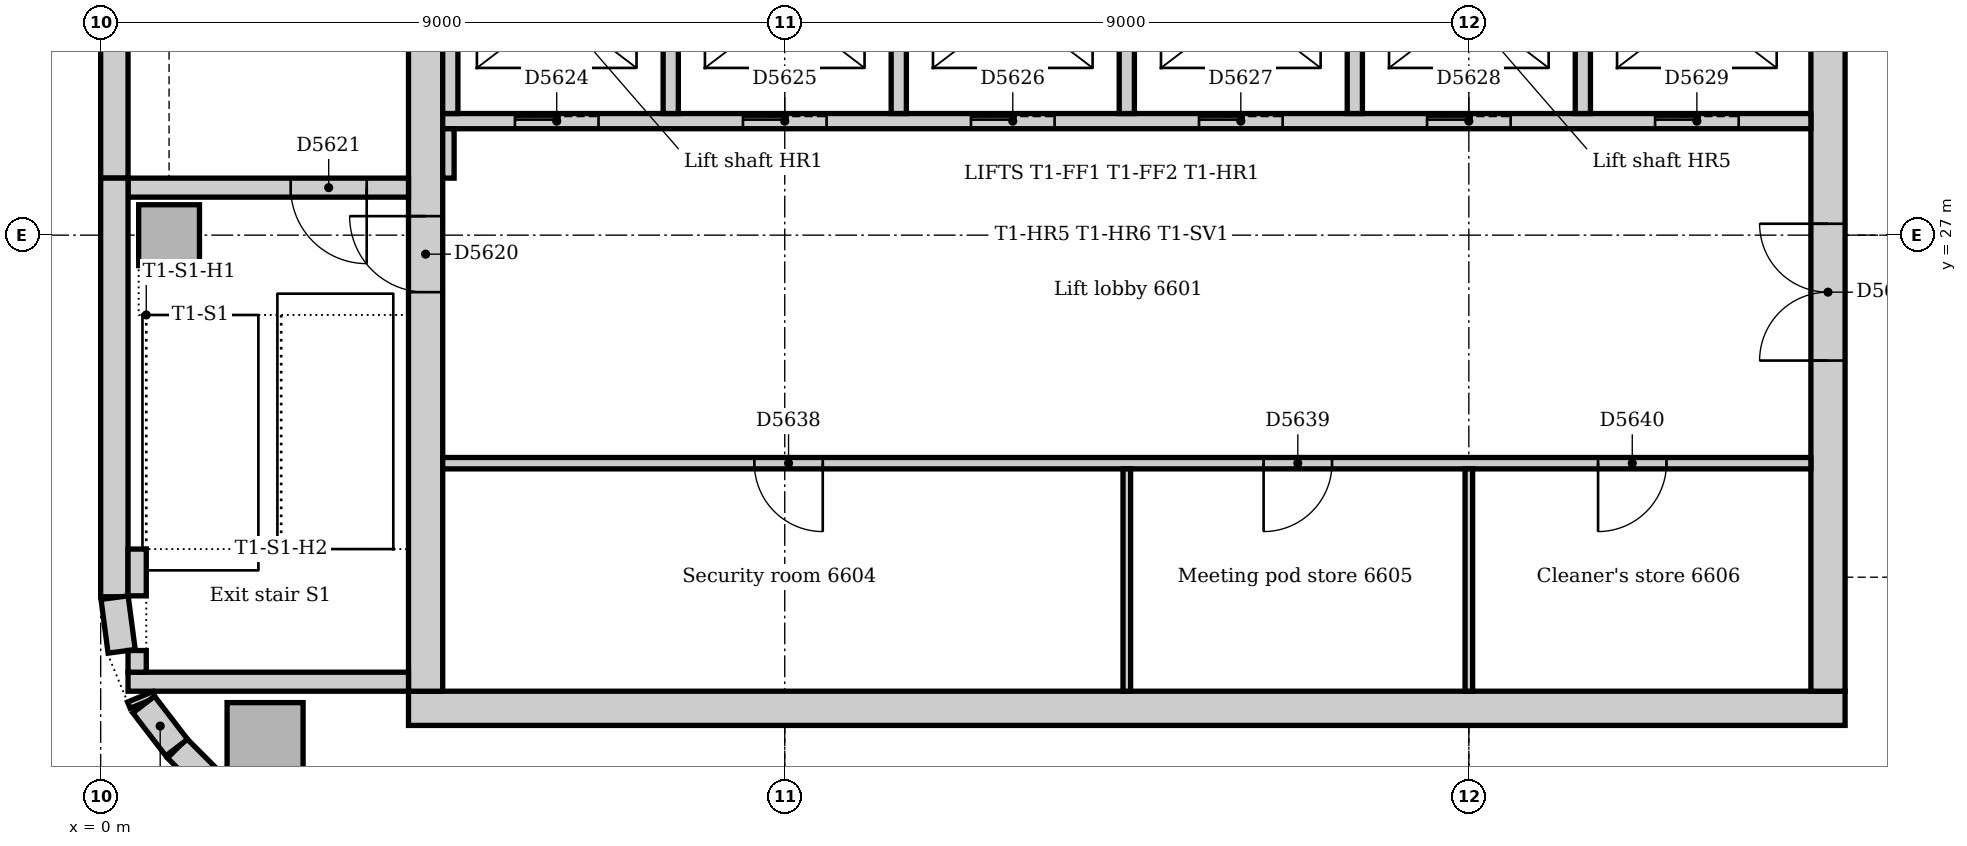
"""IFC4 building model, lengths in metres.
Left out: names, types, materials, properties, quantities, classifications, styles, units other than length and angle.
Written with IfcOpenShell. Run it as: python <this file> out.ifc"""

import sys

from ifc_helpers import new_model, si_unit, direction, frame, frame_2d, origin, origin_2d, place, context, subcontext, project, spatial, rectangle, extrude, element, fill, save


model = new_model("IFC4")
c1 = context("Model", 3, precision=1e-05, world=origin(), true_north=direction((0.0, 1.0)))
c2 = subcontext(c1, "Body", "Model", "MODEL_VIEW")
j1 = project(units=[si_unit("LENGTHUNIT", "METRE"), si_unit("PLANEANGLEUNIT", "RADIAN")], contexts=[c1])
p1 = place(None, origin())
s1 = spatial("IfcSite", under=j1, at=p1, CompositionType="ELEMENT")
p2 = place(p1, origin())
s2 = spatial("IfcBuilding", under=s1, at=p2, CompositionType="ELEMENT")
p3 = place(p2, frame((0.0, 0.0, 275.0)))
s3 = spatial("IfcBuildingStorey", under=s2, at=p3, CompositionType="ELEMENT", Elevation=275.0)
p4 = place(p3, frame((4.05, 20.775, 0.0), z_axis=(0.0, 0.0, 1.0), x_axis=(1.0, 0.0, 0.0)))
e1 = element("IfcWall", 1, at=p4, inside=s3, PredefinedType="SOLIDWALL", context=c2, shape_type="SweptSolid", body=[
    extrude(rectangle(XDim=18.9, YDim=0.45, at=frame_2d((9.45, 0.0))), origin(), (0.0, 0.0, 1.0), 4.0),
])
p5 = place(p3, frame((22.725, 21.0, 0.0), z_axis=(0.0, 0.0, 1.0), x_axis=(0.0, 1.0, 0.0)))
e2 = element("IfcWall", 2, at=p5, inside=s3, PredefinedType="SOLIDWALL", context=c2, shape_type="SweptSolid", body=[
    extrude(rectangle(XDim=10.5, YDim=0.45, at=frame_2d((5.25, 0.0))), origin(), (0.0, 0.0, 1.0), 4.0),
])
p6 = place(p5, frame((4.35, 0.0, 0.0)))
e3 = element("IfcOpeningElement", 3, at=p6, cuts=e2, PredefinedType="OPENING", context=c2, shape_type="SweptSolid", body=[
    extrude(rectangle(XDim=1.8, YDim=2.1, at=frame_2d((0.9, 1.05))), frame((0.0, 0.235, 0.0), z_axis=(0.0, -1.0, 0.0), x_axis=(1.0, 0.0, 0.0)), (0.0, 0.0, 1.0), 0.47),
])
p7 = place(p3, frame((4.275, 31.5, 0.0), z_axis=(0.0, 0.0, 1.0), x_axis=(0.0, -1.0, 0.0)))
e4 = element("IfcWall", 4, at=p7, inside=s3, PredefinedType="SOLIDWALL", context=c2, shape_type="SweptSolid", body=[
    extrude(rectangle(XDim=10.5, YDim=0.45, at=frame_2d((5.25, 0.0))), origin(), (0.0, 0.0, 1.0), 4.0),
])
p8 = place(p7, frame((4.25, 0.0, 0.0)))
e5 = element("IfcOpeningElement", 5, at=p8, cuts=e4, PredefinedType="OPENING", context=c2, shape_type="SweptSolid", body=[
    extrude(rectangle(XDim=1.0, YDim=2.1, at=frame_2d((0.5, 1.05))), frame((0.0, 0.235, 0.0), z_axis=(0.0, -1.0, 0.0), x_axis=(1.0, 0.0, 0.0)), (0.0, 0.0, 1.0), 0.47),
])
p9 = place(p3, frame((0.36, 21.125, 0.0), z_axis=(0.0, 0.0, 1.0), x_axis=(1.0, 0.0, 0.0)))
e6 = element("IfcWall", 6, at=p9, inside=s3, PredefinedType="SOLIDWALL", context=c2, shape_type="SweptSolid", body=[
    extrude(rectangle(XDim=3.69, YDim=0.25, at=frame_2d((1.845, 0.0))), origin(), (0.0, 0.0, 1.0), 4.0),
])
p10 = place(p3, frame((4.05, 27.625, 0.0), z_axis=(0.0, 0.0, 1.0), x_axis=(-1.0, 0.0, 0.0)))
e7 = element("IfcWall", 7, at=p10, inside=s3, PredefinedType="SOLIDWALL", context=c2, shape_type="SweptSolid", body=[
    extrude(rectangle(XDim=3.69, YDim=0.25, at=frame_2d((1.845, 0.0))), origin(), (0.0, 0.0, 1.0), 4.0),
])
p11 = place(p10, frame((0.55, 0.0, 0.0)))
e8 = element("IfcOpeningElement", 8, at=p11, cuts=e7, PredefinedType="OPENING", context=c2, shape_type="SweptSolid", body=[
    extrude(rectangle(XDim=1.0, YDim=2.1, at=frame_2d((0.5, 1.05))), frame((0.0, 0.135, 0.0), z_axis=(0.0, -1.0, 0.0), x_axis=(1.0, 0.0, 0.0)), (0.0, 0.0, 1.0), 0.27),
])
p12 = place(p3, frame((2.163, 20.35, 0.0), z_axis=(0.0, 0.0, 1.0), x_axis=(1.0, 0.0, 0.0)))
e9 = element("IfcColumn", 9, at=p12, inside=s3, PredefinedType="COLUMN", context=c2, shape_type="SweptSolid", body=[
    extrude(rectangle(XDim=1.0, YDim=1.0, at=origin_2d()), origin(), (0.0, 0.0, 1.0), 3.85),
])
p13 = place(p3, frame((0.9, 27.0, 0.0), z_axis=(0.0, 0.0, 1.0), x_axis=(1.0, 0.0, 0.0)))
e10 = element("IfcColumn", 10, at=p13, inside=s3, PredefinedType="COLUMN", context=c2, shape_type="SweptSolid", body=[
    extrude(rectangle(XDim=0.8, YDim=0.8, at=origin_2d()), origin(), (0.0, 0.0, 1.0), 4.0),
])
p14 = place(p3, frame((0.18, 35.25, 0.0), z_axis=(0.0, 0.0, 1.0), x_axis=(0.0, -1.0, 0.0)))
e11 = element("IfcWall", 11, at=p14, inside=s3, PredefinedType="STANDARD", context=c2, shape_type="SweptSolid", body=[
    extrude(rectangle(XDim=7.5, YDim=0.36, at=frame_2d((3.75, 0.0))), origin(), (0.0, 0.0, 1.0), 3.85),
])
p15 = place(p3, frame((0.18, 27.75, 0.0), z_axis=(0.0, 0.0, 1.0), x_axis=(0.0, -1.0, 0.0)))
e12 = element("IfcWall", 12, at=p15, inside=s3, PredefinedType="STANDARD", context=c2, shape_type="SweptSolid", body=[
    extrude(rectangle(XDim=5.507, YDim=0.36, at=frame_2d((2.754, 0.0))), origin(), (0.0, 0.0, 1.0), 3.85),
])
p16 = place(p3, frame((1.006, 20.249, 0.0), z_axis=(0.0, 0.0, 1.0), x_axis=(0.707106781187, -0.707106781187, 0.0)))
e13 = element("IfcWall", 13, at=p16, inside=s3, PredefinedType="STANDARD", context=c2, shape_type="SweptSolid", body=[
    extrude(rectangle(XDim=1.757, YDim=0.36, at=frame_2d((0.879, 0.0))), origin(), (0.0, 0.0, 1.0), 3.85),
])
p17 = place(p3, frame((0.183, 22.231, 0.0), z_axis=(0.0, 0.0, 1.0), x_axis=(0.13055608231, -0.99144092581, 0.0)))
e14 = element("IfcWall", 14, at=p17, inside=s3, PredefinedType="STANDARD", context=c2, shape_type="SweptSolid", body=[
    extrude(rectangle(XDim=0.713, YDim=0.36, at=frame_2d((0.356, 0.0))), origin(), (0.0, 0.0, 1.0), 3.85),
])
p18 = place(p3, frame((0.521, 20.927, 0.0), z_axis=(0.0, 0.0, 1.0), x_axis=(0.382549378284, -0.923935048136, 0.0)))
e15 = element("IfcWall", 15, at=p18, inside=s3, PredefinedType="STANDARD", context=c2, shape_type="SweptSolid", body=[
    extrude(rectangle(XDim=0.089, YDim=0.36, at=frame_2d((0.045, 0.0))), origin(), (0.0, 0.0, 1.0), 3.85),
])
p19 = place(p3, frame((0.566, 20.825, 0.0), z_axis=(0.0, 0.0, 1.0), x_axis=(0.608802368033, -0.793321924995, 0.0)))
e16 = element("IfcWall", 16, at=p19, inside=s3, PredefinedType="STANDARD", context=c2, shape_type="SweptSolid", body=[
    extrude(rectangle(XDim=0.713, YDim=0.36, at=frame_2d((0.357, 0.0))), origin(), (0.0, 0.0, 1.0), 3.85),
])
p20 = place(p3, frame((0.48, 21.25, 0.0), z_axis=(0.0, 0.0, 1.0), x_axis=(0.0, 1.0, 0.0)))
e17 = element("IfcWall", 17, at=p20, inside=s3, PredefinedType="STANDARD", context=c2, shape_type="SweptSolid", body=[
    extrude(rectangle(XDim=0.285, YDim=0.24, at=frame_2d((0.143, 0.0))), origin(), (0.0, 0.0, 1.0), 4.0),
])
p21 = place(p3, frame((0.48, 22.255, 0.0), z_axis=(0.0, 0.0, 1.0), x_axis=(0.0, 1.0, 0.0)))
e18 = element("IfcWall", 18, at=p21, inside=s3, PredefinedType="STANDARD", context=c2, shape_type="SweptSolid", body=[
    extrude(rectangle(XDim=0.615, YDim=0.24, at=frame_2d((0.307, 0.0))), origin(), (0.0, 0.0, 1.0), 4.0),
])
p22 = place(p3, frame((4.5, 28.5, 0.0), z_axis=(0.0, 0.0, 1.0), x_axis=(1.0, 0.0, 0.0)))
e19 = element("IfcWall", 19, at=p22, inside=s3, PredefinedType="PARTITIONING", context=c2, shape_type="SweptSolid", body=[
    extrude(rectangle(XDim=18.0, YDim=0.2, at=frame_2d((9.0, 0.0))), origin(), (0.0, 0.0, 1.0), 3.85),
])
p23 = place(p22, frame((0.95, 0.0, 0.0)))
e20 = element("IfcOpeningElement", 20, at=p23, cuts=e19, PredefinedType="OPENING", context=c2, shape_type="SweptSolid", body=[
    extrude(rectangle(XDim=1.1, YDim=2.1, at=frame_2d((0.55, 1.05))), frame((0.0, 0.11, 0.0), z_axis=(0.0, -1.0, 0.0), x_axis=(1.0, 0.0, 0.0)), (0.0, 0.0, 1.0), 0.22),
])
p24 = place(p22, frame((3.95, 0.0, 0.0)))
e21 = element("IfcOpeningElement", 21, at=p24, cuts=e19, PredefinedType="OPENING", context=c2, shape_type="SweptSolid", body=[
    extrude(rectangle(XDim=1.1, YDim=2.1, at=frame_2d((0.55, 1.05))), frame((0.0, 0.11, 0.0), z_axis=(0.0, -1.0, 0.0), x_axis=(1.0, 0.0, 0.0)), (0.0, 0.0, 1.0), 0.22),
])
p25 = place(p22, frame((6.95, 0.0, 0.0)))
e22 = element("IfcOpeningElement", 22, at=p25, cuts=e19, PredefinedType="OPENING", context=c2, shape_type="SweptSolid", body=[
    extrude(rectangle(XDim=1.1, YDim=2.1, at=frame_2d((0.55, 1.05))), frame((0.0, 0.11, 0.0), z_axis=(0.0, -1.0, 0.0), x_axis=(1.0, 0.0, 0.0)), (0.0, 0.0, 1.0), 0.22),
])
p26 = place(p22, frame((9.95, 0.0, 0.0)))
e23 = element("IfcOpeningElement", 23, at=p26, cuts=e19, PredefinedType="OPENING", context=c2, shape_type="SweptSolid", body=[
    extrude(rectangle(XDim=1.1, YDim=2.1, at=frame_2d((0.55, 1.05))), frame((0.0, 0.11, 0.0), z_axis=(0.0, -1.0, 0.0), x_axis=(1.0, 0.0, 0.0)), (0.0, 0.0, 1.0), 0.22),
])
p27 = place(p22, frame((12.95, 0.0, 0.0)))
e24 = element("IfcOpeningElement", 24, at=p27, cuts=e19, PredefinedType="OPENING", context=c2, shape_type="SweptSolid", body=[
    extrude(rectangle(XDim=1.1, YDim=2.1, at=frame_2d((0.55, 1.05))), frame((0.0, 0.11, 0.0), z_axis=(0.0, -1.0, 0.0), x_axis=(1.0, 0.0, 0.0)), (0.0, 0.0, 1.0), 0.22),
])
p28 = place(p22, frame((15.95, 0.0, 0.0)))
e25 = element("IfcOpeningElement", 25, at=p28, cuts=e19, PredefinedType="OPENING", context=c2, shape_type="SweptSolid", body=[
    extrude(rectangle(XDim=1.1, YDim=2.1, at=frame_2d((0.55, 1.05))), frame((0.0, 0.11, 0.0), z_axis=(0.0, -1.0, 0.0), x_axis=(1.0, 0.0, 0.0)), (0.0, 0.0, 1.0), 0.22),
])
for number, where, z_axis, x_axis in (
    (26, (10.5, 28.6, 0.0), (0.0, 0.0, 1.0), (0.0, 1.0, 0.0)),
    (27, (13.5, 28.6, 0.0), (0.0, 0.0, 1.0), (0.0, 1.0, 0.0)),
    (28, (16.5, 28.6, 0.0), (0.0, 0.0, 1.0), (0.0, 1.0, 0.0)),
    (29, (19.5, 28.6, 0.0), (0.0, 0.0, 1.0), (0.0, 1.0, 0.0)),
    (30, (4.6, 28.6, 0.0), (0.0, 0.0, 1.0), (0.0, 1.0, 0.0)),
    (31, (7.5, 28.6, 0.0), (0.0, 0.0, 1.0), (0.0, 1.0, 0.0)),
):
    element("IfcWall", number, at=place(p3, frame(where, z_axis=z_axis, x_axis=x_axis)), inside=s3, PredefinedType="PARTITIONING", context=c2, shape_type="SweptSolid", body=[
        extrude(rectangle(XDim=2.65, YDim=0.2, at=frame_2d((1.325, 0.0))), origin(), (0.0, 0.0, 1.0), 3.85),
    ])
p29 = place(p3, frame((4.5, 24.0, 0.0), z_axis=(0.0, 0.0, 1.0), x_axis=(1.0, 0.0, 0.0)))
e32 = element("IfcWall", 32, at=p29, inside=s3, PredefinedType="PARTITIONING", context=c2, shape_type="SweptSolid", body=[
    extrude(rectangle(XDim=18.0, YDim=0.15, at=frame_2d((9.0, 0.0))), origin(), (0.0, 0.0, 1.0), 3.85),
])
p30 = place(p29, frame((4.1, 0.0, 0.0)))
e33 = element("IfcOpeningElement", 33, at=p30, cuts=e32, PredefinedType="OPENING", context=c2, shape_type="SweptSolid", body=[
    extrude(rectangle(XDim=0.9, YDim=2.1, at=frame_2d((0.45, 1.05))), frame((0.0, 0.085, 0.0), z_axis=(0.0, -1.0, 0.0), x_axis=(1.0, 0.0, 0.0)), (0.0, 0.0, 1.0), 0.17),
])
p31 = place(p29, frame((10.8, 0.0, 0.0)))
e34 = element("IfcOpeningElement", 34, at=p31, cuts=e32, PredefinedType="OPENING", context=c2, shape_type="SweptSolid", body=[
    extrude(rectangle(XDim=0.9, YDim=2.1, at=frame_2d((0.45, 1.05))), frame((0.0, 0.085, 0.0), z_axis=(0.0, -1.0, 0.0), x_axis=(1.0, 0.0, 0.0)), (0.0, 0.0, 1.0), 0.17),
])
p32 = place(p29, frame((15.2, 0.0, 0.0)))
e35 = element("IfcOpeningElement", 35, at=p32, cuts=e32, PredefinedType="OPENING", context=c2, shape_type="SweptSolid", body=[
    extrude(rectangle(XDim=0.9, YDim=2.1, at=frame_2d((0.45, 1.05))), frame((0.0, 0.085, 0.0), z_axis=(0.0, -1.0, 0.0), x_axis=(1.0, 0.0, 0.0)), (0.0, 0.0, 1.0), 0.17),
])
p33 = place(p3, frame((4.575, 27.75, 0.0), z_axis=(0.0, 0.0, 1.0), x_axis=(0.0, 1.0, 0.0)))
e36 = element("IfcWall", 36, at=p33, inside=s3, PredefinedType="PARTITIONING", context=c2, shape_type="SweptSolid", body=[
    extrude(rectangle(XDim=0.65, YDim=0.15, at=frame_2d((0.325, 0.0))), origin(), (0.0, 0.0, 1.0), 3.85),
])
for number, where, z_axis, x_axis in (
    (37, (13.5, 21.0, 0.0), (0.0, 0.0, 1.0), (0.0, 1.0, 0.0)),
    (38, (18.0, 21.0, 0.0), (0.0, 0.0, 1.0), (0.0, 1.0, 0.0)),
):
    element("IfcWall", number, at=place(p3, frame(where, z_axis=z_axis, x_axis=x_axis)), inside=s3, PredefinedType="PARTITIONING", context=c2, shape_type="SweptSolid", body=[
        extrude(rectangle(XDim=2.925, YDim=0.1, at=frame_2d((1.462, 0.0))), origin(), (0.0, 0.0, 1.0), 3.85),
    ])
p34 = place(p8, frame((1.0, 0.0, 0.0), z_axis=(0.0, 0.0, 1.0), x_axis=(-1.0, 0.0, 0.0)))
e39 = element("IfcDoor", 39, at=p34, inside=s3, OperationType="SINGLE_SWING_RIGHT", PredefinedType="DOOR", context=c2, shape_type="SweptSolid", body=[
    extrude(rectangle(XDim=1.0, YDim=2.1, at=frame_2d((0.5, 1.05))), frame((0.0, 0.025, 0.0), z_axis=(0.0, -1.0, 0.0), x_axis=(1.0, 0.0, 0.0)), (0.0, 0.0, 1.0), 0.05),
])
fill(e5, e39)
p35 = place(p11, origin())
e40 = element("IfcDoor", 40, at=p35, inside=s3, OperationType="SINGLE_SWING_LEFT", PredefinedType="DOOR", context=c2, shape_type="SweptSolid", body=[
    extrude(rectangle(XDim=1.0, YDim=2.1, at=frame_2d((0.5, 1.05))), frame((0.0, 0.025, 0.0), z_axis=(0.0, -1.0, 0.0), x_axis=(1.0, 0.0, 0.0)), (0.0, 0.0, 1.0), 0.05),
])
fill(e8, e40)
p36 = place(p23, origin())
e41 = element("IfcDoor", 41, at=p36, inside=s3, OperationType="SLIDING_TO_LEFT", PredefinedType="DOOR", context=c2, shape_type="SweptSolid", body=[
    extrude(rectangle(XDim=1.1, YDim=2.1, at=frame_2d((0.55, 1.05))), frame((0.0, 0.025, 0.0), z_axis=(0.0, -1.0, 0.0), x_axis=(1.0, 0.0, 0.0)), (0.0, 0.0, 1.0), 0.05),
])
fill(e20, e41)
p37 = place(p24, origin())
e42 = element("IfcDoor", 42, at=p37, inside=s3, OperationType="SLIDING_TO_LEFT", PredefinedType="DOOR", context=c2, shape_type="SweptSolid", body=[
    extrude(rectangle(XDim=1.1, YDim=2.1, at=frame_2d((0.55, 1.05))), frame((0.0, 0.025, 0.0), z_axis=(0.0, -1.0, 0.0), x_axis=(1.0, 0.0, 0.0)), (0.0, 0.0, 1.0), 0.05),
])
fill(e21, e42)
p38 = place(p25, origin())
e43 = element("IfcDoor", 43, at=p38, inside=s3, OperationType="SLIDING_TO_LEFT", PredefinedType="DOOR", context=c2, shape_type="SweptSolid", body=[
    extrude(rectangle(XDim=1.1, YDim=2.1, at=frame_2d((0.55, 1.05))), frame((0.0, 0.025, 0.0), z_axis=(0.0, -1.0, 0.0), x_axis=(1.0, 0.0, 0.0)), (0.0, 0.0, 1.0), 0.05),
])
fill(e22, e43)
p39 = place(p26, origin())
e44 = element("IfcDoor", 44, at=p39, inside=s3, OperationType="SLIDING_TO_LEFT", PredefinedType="DOOR", context=c2, shape_type="SweptSolid", body=[
    extrude(rectangle(XDim=1.1, YDim=2.1, at=frame_2d((0.55, 1.05))), frame((0.0, 0.025, 0.0), z_axis=(0.0, -1.0, 0.0), x_axis=(1.0, 0.0, 0.0)), (0.0, 0.0, 1.0), 0.05),
])
fill(e23, e44)
p40 = place(p27, origin())
e45 = element("IfcDoor", 45, at=p40, inside=s3, OperationType="SLIDING_TO_LEFT", PredefinedType="DOOR", context=c2, shape_type="SweptSolid", body=[
    extrude(rectangle(XDim=1.1, YDim=2.1, at=frame_2d((0.55, 1.05))), frame((0.0, 0.025, 0.0), z_axis=(0.0, -1.0, 0.0), x_axis=(1.0, 0.0, 0.0)), (0.0, 0.0, 1.0), 0.05),
])
fill(e24, e45)
p41 = place(p28, origin())
e46 = element("IfcDoor", 46, at=p41, inside=s3, OperationType="SLIDING_TO_LEFT", PredefinedType="DOOR", context=c2, shape_type="SweptSolid", body=[
    extrude(rectangle(XDim=1.1, YDim=2.1, at=frame_2d((0.55, 1.05))), frame((0.0, 0.025, 0.0), z_axis=(0.0, -1.0, 0.0), x_axis=(1.0, 0.0, 0.0)), (0.0, 0.0, 1.0), 0.05),
])
fill(e25, e46)
p42 = place(p6, origin())
e47 = element("IfcDoor", 47, at=p42, inside=s3, OperationType="DOUBLE_DOOR_DOUBLE_SWING", PredefinedType="DOOR", context=c2, shape_type="SweptSolid", body=[
    extrude(rectangle(XDim=1.8, YDim=2.1, at=frame_2d((0.9, 1.05))), frame((0.0, 0.025, 0.0), z_axis=(0.0, -1.0, 0.0), x_axis=(1.0, 0.0, 0.0)), (0.0, 0.0, 1.0), 0.05),
])
fill(e3, e47)
p43 = place(p30, frame((0.9, 0.0, 0.0), z_axis=(0.0, 0.0, 1.0), x_axis=(-1.0, 0.0, 0.0)))
e48 = element("IfcDoor", 48, at=p43, inside=s3, OperationType="SINGLE_SWING_LEFT", PredefinedType="DOOR", context=c2, shape_type="SweptSolid", body=[
    extrude(rectangle(XDim=0.9, YDim=2.1, at=frame_2d((0.45, 1.05))), frame((0.0, 0.025, 0.0), z_axis=(0.0, -1.0, 0.0), x_axis=(1.0, 0.0, 0.0)), (0.0, 0.0, 1.0), 0.05),
])
fill(e33, e48)
p44 = place(p31, frame((0.9, 0.0, 0.0), z_axis=(0.0, 0.0, 1.0), x_axis=(-1.0, 0.0, 0.0)))
e49 = element("IfcDoor", 49, at=p44, inside=s3, OperationType="SINGLE_SWING_RIGHT", PredefinedType="DOOR", context=c2, shape_type="SweptSolid", body=[
    extrude(rectangle(XDim=0.9, YDim=2.1, at=frame_2d((0.45, 1.05))), frame((0.0, 0.025, 0.0), z_axis=(0.0, -1.0, 0.0), x_axis=(1.0, 0.0, 0.0)), (0.0, 0.0, 1.0), 0.05),
])
fill(e34, e49)
p45 = place(p32, frame((0.9, 0.0, 0.0), z_axis=(0.0, 0.0, 1.0), x_axis=(-1.0, 0.0, 0.0)))
e50 = element("IfcDoor", 50, at=p45, inside=s3, OperationType="SINGLE_SWING_RIGHT", PredefinedType="DOOR", context=c2, shape_type="SweptSolid", body=[
    extrude(rectangle(XDim=0.9, YDim=2.1, at=frame_2d((0.45, 1.05))), frame((0.0, 0.025, 0.0), z_axis=(0.0, -1.0, 0.0), x_axis=(1.0, 0.0, 0.0)), (0.0, 0.0, 1.0), 0.05),
])
fill(e35, e50)
save(model, sys.argv[1])
